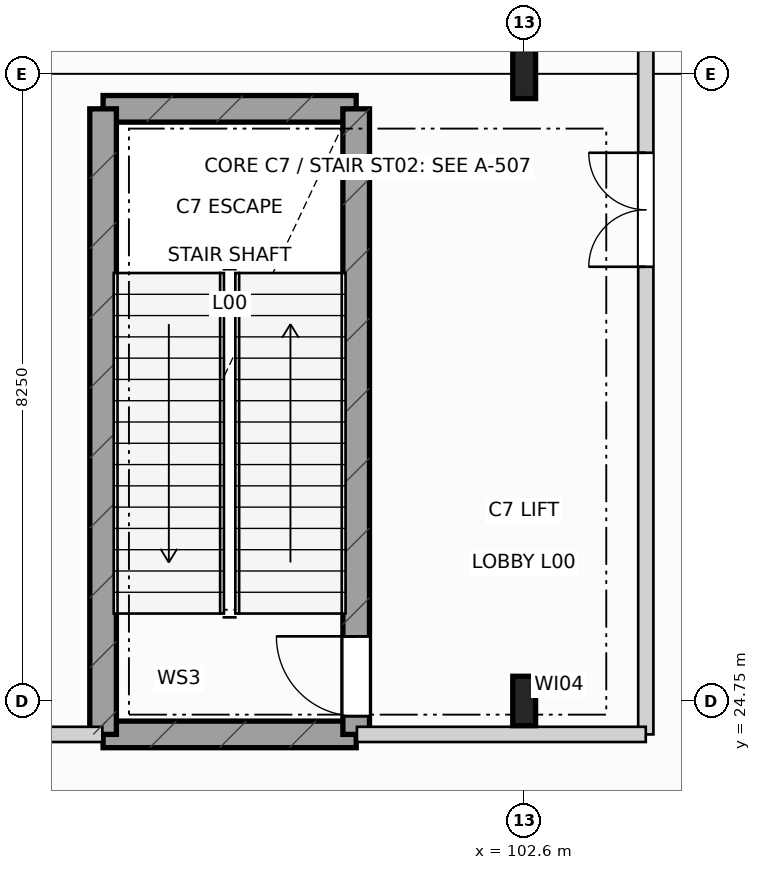
"""IFC4 building model, lengths in metres.
Left out: names, types, materials, properties, quantities, classifications, styles, units other than length and angle.
Written with IfcOpenShell. Run it as: python <this file> out.ifc"""

import sys

from ifc_helpers import new_model, si_unit, direction, frame, frame_2d, origin, origin_2d, place, context, subcontext, project, spatial, rectangle, i_section, extrude, element, fill, save


model = new_model("IFC4")
c1 = context("Model", 3, precision=1e-05, world=origin(), true_north=direction((0.0, 1.0)))
c2 = subcontext(c1, "Body", "Model", "MODEL_VIEW")
j1 = project(units=[si_unit("LENGTHUNIT", "METRE"), si_unit("PLANEANGLEUNIT", "RADIAN")], contexts=[c1])
p1 = place(None, origin())
s1 = spatial("IfcSite", under=j1, at=p1, CompositionType="ELEMENT")
p2 = place(p1, origin())
s2 = spatial("IfcBuilding", under=s1, at=p2, CompositionType="ELEMENT")
p3 = place(p2, origin())
s3 = spatial("IfcBuildingStorey", under=s2, at=p3, CompositionType="ELEMENT", Elevation=0.0)
for number, where, z_axis, x_axis in (
    (1, (102.6, 24.75, 0.0), (0.0, 0.0, 1.0), (1.0, 0.0, 0.0)),
    (2, (102.6, 33.0, 0.0), (0.0, 0.0, 1.0), (1.0, 0.0, 0.0)),
):
    element("IfcColumn", number, at=place(p3, frame(where, z_axis=z_axis, x_axis=x_axis)), inside=s3, PredefinedType="COLUMN", context=c2, shape_type="SweptSolid", body=[
        extrude(i_section(OverallWidth=0.3, OverallDepth=0.65, WebThickness=0.016, FlangeThickness=0.031, at=origin_2d()), origin(), (0.0, 0.0, 1.0), 6.0),
    ])
for number, where, z_axis, x_axis in (
    (3, (97.06, 24.31, 0.0), (0.0, 0.0, 1.0), (1.0, 0.0, 0.0)),
    (4, (97.06, 32.54, 0.0), (0.0, 0.0, 1.0), (1.0, 0.0, 0.0)),
):
    element("IfcWall", number, at=place(p3, frame(where, z_axis=z_axis, x_axis=x_axis)), inside=s3, PredefinedType="SHEAR", context=c2, shape_type="SweptSolid", body=[
        extrude(rectangle(XDim=3.33, YDim=0.35, at=frame_2d((1.665, 0.0))), origin(), (0.0, 0.0, 1.0), 5.7),
    ])
p4 = place(p3, frame((97.06, 24.31, 0.0), z_axis=(0.0, 0.0, 1.0), x_axis=(0.0, 1.0, 0.0)))
e5 = element("IfcWall", 5, at=p4, inside=s3, PredefinedType="SHEAR", context=c2, shape_type="SweptSolid", body=[
    extrude(rectangle(XDim=8.23, YDim=0.35, at=frame_2d((4.115, 0.0))), origin(), (0.0, 0.0, 1.0), 5.7),
])
p5 = place(p3, frame((100.39, 24.31, 0.0), z_axis=(0.0, 0.0, 1.0), x_axis=(0.0, 1.0, 0.0)))
e6 = element("IfcWall", 6, at=p5, inside=s3, PredefinedType="SHEAR", context=c2, shape_type="SweptSolid", body=[
    extrude(rectangle(XDim=8.23, YDim=0.35, at=frame_2d((4.115, 0.0))), origin(), (0.0, 0.0, 1.0), 5.7),
])
p6 = place(p5, frame((0.24, 0.0, 0.0)))
e7 = element("IfcOpeningElement", 7, at=p6, cuts=e6, PredefinedType="OPENING", context=c2, shape_type="SweptSolid", body=[
    extrude(rectangle(XDim=1.05, YDim=2.18, at=frame_2d((0.525, 1.09))), frame((0.0, 0.185, 0.0), z_axis=(0.0, -1.0, 0.0), x_axis=(1.0, 0.0, 0.0)), (0.0, 0.0, 1.0), 0.37),
])
p7 = place(p3, frame((104.2, 24.31, 0.0), z_axis=(0.0, 0.0, 1.0), x_axis=(0.0, 1.0, 0.0)))
e8 = element("IfcWall", 8, at=p7, inside=s3, PredefinedType="PARTITIONING", context=c2, shape_type="SweptSolid", body=[
    extrude(rectangle(XDim=17.69, YDim=0.2, at=frame_2d((8.845, 0.0))), origin(), (0.0, 0.0, 1.0), 5.015),
])
p8 = place(p7, frame((6.152, 0.0, 0.0)))
e9 = element("IfcOpeningElement", 9, at=p8, cuts=e8, PredefinedType="OPENING", context=c2, shape_type="SweptSolid", body=[
    extrude(rectangle(XDim=1.5, YDim=2.2, at=frame_2d((0.75, 1.1))), frame((0.0, 0.11, 0.0), z_axis=(0.0, -1.0, 0.0), x_axis=(1.0, 0.0, 0.0)), (0.0, 0.0, 1.0), 0.22),
])
p9 = place(p3, frame((95.6, 24.31, 0.0), z_axis=(0.0, 0.0, 1.0), x_axis=(1.0, 0.0, 0.0)))
e10 = element("IfcWall", 10, at=p9, inside=s3, PredefinedType="PARTITIONING", context=c2, shape_type="SweptSolid", body=[
    extrude(rectangle(XDim=1.45, YDim=0.2, at=frame_2d((0.725, 0.0))), origin(), (0.0, 0.0, 1.0), 5.065),
])
p10 = place(p3, frame((100.4, 24.31, 0.0), z_axis=(0.0, 0.0, 1.0), x_axis=(1.0, 0.0, 0.0)))
e11 = element("IfcWall", 11, at=p10, inside=s3, PredefinedType="PARTITIONING", context=c2, shape_type="SweptSolid", body=[
    extrude(rectangle(XDim=3.8, YDim=0.2, at=frame_2d((1.9, 0.0))), origin(), (0.0, 0.0, 1.0), 4.965),
])
p11 = place(p6, origin())
e12 = element("IfcDoor", 12, at=p11, inside=s3, OperationType="SINGLE_SWING_RIGHT", PredefinedType="DOOR", context=c2, shape_type="SweptSolid", body=[
    extrude(rectangle(XDim=1.05, YDim=2.18, at=frame_2d((0.525, 1.09))), frame((0.0, 0.025, 0.0), z_axis=(0.0, -1.0, 0.0), x_axis=(1.0, 0.0, 0.0)), (0.0, 0.0, 1.0), 0.05),
])
fill(e7, e12)
p12 = place(p8, origin())
e13 = element("IfcDoor", 13, at=p12, inside=s3, OperationType="DOUBLE_DOOR_SINGLE_SWING", PredefinedType="DOOR", context=c2, shape_type="SweptSolid", body=[
    extrude(rectangle(XDim=1.5, YDim=2.2, at=frame_2d((0.75, 1.1))), frame((0.0, 0.025, 0.0), z_axis=(0.0, -1.0, 0.0), x_axis=(1.0, 0.0, 0.0)), (0.0, 0.0, 1.0), 0.05),
])
fill(e9, e13)
save(model, sys.argv[1])
